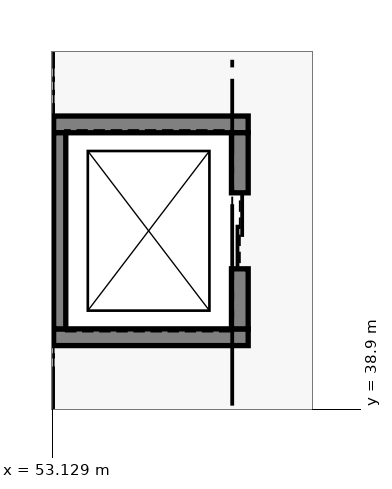
"""IFC4 building model, lengths in metres.
Left out: names, types, materials, properties, quantities, classifications, styles, units other than length and angle.
Written with IfcOpenShell. Run it as: python <this file> out.ifc"""

import sys

from ifc_helpers import new_model, si_unit, direction, frame, frame_2d, origin, place, context, subcontext, project, spatial, rectangle, extrude, element, fill, save


model = new_model("IFC4")
c1 = context("Model", 3, precision=1e-05, world=origin(), true_north=direction((0.0, 1.0)))
c2 = subcontext(c1, "Body", "Model", "MODEL_VIEW")
j1 = project(units=[si_unit("LENGTHUNIT", "METRE"), si_unit("PLANEANGLEUNIT", "RADIAN")], contexts=[c1])
p1 = place(None, origin())
s1 = spatial("IfcSite", under=j1, at=p1, CompositionType="ELEMENT")
p2 = place(p1, origin())
s2 = spatial("IfcBuilding", under=s1, at=p2, CompositionType="ELEMENT")
p3 = place(p2, frame((0.0, 0.0, 4.8)))
s3 = spatial("IfcBuildingStorey", under=s2, at=p3, CompositionType="ELEMENT", Elevation=4.8)
for number, where, z_axis, x_axis in (
    (1, (53.09, 39.85, 0.0), (0.0, 0.0, 1.0), (1.0, 0.0, 0.0)),
    (2, (53.09, 42.65, 0.0), (0.0, 0.0, 1.0), (1.0, 0.0, 0.0)),
):
    element("IfcWall", number, at=place(p3, frame(where, z_axis=z_axis, x_axis=x_axis)), inside=s3, PredefinedType="SOLIDWALL", context=c2, shape_type="SweptSolid", body=[
        extrude(rectangle(XDim=2.62, YDim=0.22, at=frame_2d((1.31, 0.0))), origin(), (0.0, 0.0, 1.0), 3.92),
    ])
p4 = place(p3, frame((53.2, 39.96, 0.0), z_axis=(0.0, 0.0, 1.0), x_axis=(0.0, 1.0, 0.0)))
e3 = element("IfcWall", 3, at=p4, inside=s3, PredefinedType="SOLIDWALL", context=c2, shape_type="SweptSolid", body=[
    extrude(rectangle(XDim=2.58, YDim=0.22, at=frame_2d((1.29, 0.0))), origin(), (0.0, 0.0, 1.0), 3.92),
])
p5 = place(p3, frame((55.6, 39.96, 0.0), z_axis=(0.0, 0.0, 1.0), x_axis=(0.0, 1.0, 0.0)))
e4 = element("IfcWall", 4, at=p5, inside=s3, PredefinedType="SOLIDWALL", context=c2, shape_type="SweptSolid", body=[
    extrude(rectangle(XDim=2.58, YDim=0.22, at=frame_2d((1.29, 0.0))), origin(), (0.0, 0.0, 1.0), 3.92),
])
p6 = place(p5, frame((0.79, 0.0, 0.0)))
e5 = element("IfcOpeningElement", 5, at=p6, cuts=e4, PredefinedType="OPENING", context=c2, shape_type="SweptSolid", body=[
    extrude(rectangle(XDim=1.0, YDim=2.15, at=frame_2d((0.5, 1.075))), frame((0.0, 0.12, 0.0), z_axis=(0.0, -1.0, 0.0), x_axis=(1.0, 0.0, 0.0)), (0.0, 0.0, 1.0), 0.24),
])
p7 = place(p6, origin())
e6 = element("IfcDoor", 6, at=p7, inside=s3, OperationType="SLIDING_TO_LEFT", PredefinedType="DOOR", context=c2, shape_type="SweptSolid", body=[
    extrude(rectangle(XDim=1.0, YDim=2.15, at=frame_2d((0.5, 1.075))), frame((0.0, 0.025, 0.0), z_axis=(0.0, -1.0, 0.0), x_axis=(1.0, 0.0, 0.0)), (0.0, 0.0, 1.0), 0.05),
])
fill(e5, e6)
save(model, sys.argv[1])
